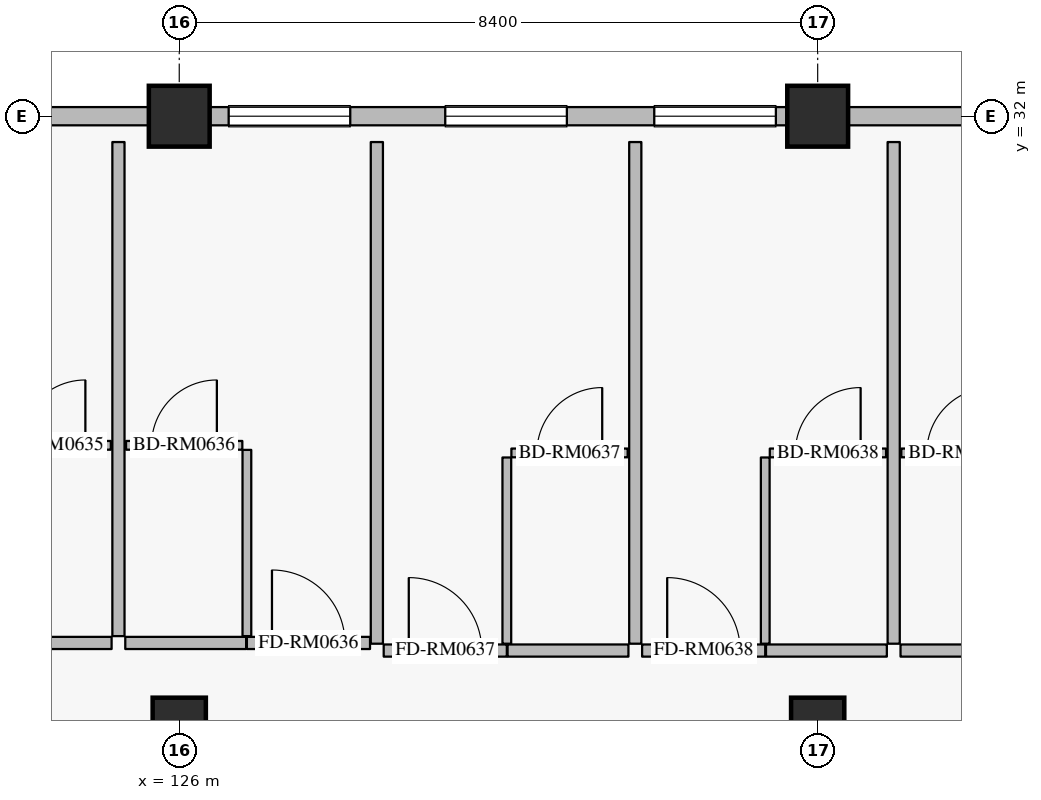
"""IFC4 building model, lengths in metres.
Left out: names, types, materials, properties, quantities, classifications, styles, units other than length and angle.
Written with IfcOpenShell. Run it as: python <this file> out.ifc"""

import sys

from ifc_helpers import new_model, si_unit, direction, frame, frame_2d, origin, origin_2d, place, context, subcontext, project, spatial, rectangle, extrude, element, fill, save


model = new_model("IFC4")
c1 = context("Model", 3, precision=1e-05, world=origin(), true_north=direction((0.0, 1.0)))
c2 = subcontext(c1, "Body", "Model", "MODEL_VIEW")
j1 = project(units=[si_unit("LENGTHUNIT", "METRE"), si_unit("PLANEANGLEUNIT", "RADIAN")], contexts=[c1])
p1 = place(None, origin())
s1 = spatial("IfcSite", under=j1, at=p1, CompositionType="ELEMENT")
p2 = place(p1, origin())
s2 = spatial("IfcBuilding", under=s1, at=p2, CompositionType="ELEMENT")
p3 = place(p2, frame((0.0, 0.0, 25.2)))
s3 = spatial("IfcBuildingStorey", under=s2, at=p3, CompositionType="ELEMENT", Elevation=25.2)
for number, where, z_axis, x_axis in (
    (1, (126.0, 32.0, 0.0), (0.0, 0.0, 1.0), (1.0, 0.0, 0.0)),
    (2, (134.4, 32.0, 0.0), (0.0, 0.0, 1.0), (1.0, 0.0, 0.0)),
):
    element("IfcColumn", number, at=place(p3, frame(where, z_axis=z_axis, x_axis=x_axis)), inside=s3, PredefinedType="COLUMN", context=c2, shape_type="SweptSolid", body=[
        extrude(rectangle(XDim=0.8, YDim=0.8, at=origin_2d()), origin(), (0.0, 0.0, 1.0), 3.6),
    ])
for number, where, z_axis, x_axis in (
    (3, (126.0, 24.0, 0.0), (0.0, 0.0, 1.0), (1.0, 0.0, 0.0)),
    (4, (134.4, 24.0, 0.0), (0.0, 0.0, 1.0), (1.0, 0.0, 0.0)),
):
    element("IfcColumn", number, at=place(p3, frame(where, z_axis=z_axis, x_axis=x_axis)), inside=s3, PredefinedType="COLUMN", context=c2, shape_type="SweptSolid", body=[
        extrude(rectangle(XDim=0.7, YDim=0.7, at=origin_2d()), origin(), (0.0, 0.0, 1.0), 3.6),
    ])
p4 = place(p3, frame((118.0, 32.0, 0.0), z_axis=(0.0, 0.0, 1.0), x_axis=(1.0, 0.0, 0.0)))
e5 = element("IfcWall", 5, at=p4, inside=s3, PredefinedType="SOLIDWALL", context=c2, shape_type="SweptSolid", body=[
    extrude(rectangle(XDim=7.6, YDim=0.24, at=frame_2d((3.8, 0.0))), origin(), (0.0, 0.0, 1.0), 2.93),
])
p5 = place(p4, frame((1.3, 0.0, 0.8)))
e6 = element("IfcOpeningElement", 6, at=p5, cuts=e5, PredefinedType="OPENING", context=c2, shape_type="SweptSolid", body=[
    extrude(rectangle(XDim=1.6, YDim=1.6, at=frame_2d((0.8, 0.8))), frame((0.0, 0.13, 0.0), z_axis=(0.0, -1.0, 0.0), x_axis=(1.0, 0.0, 0.0)), (0.0, 0.0, 1.0), 0.26),
])
p6 = place(p4, frame((4.7, 0.0, 0.8)))
e7 = element("IfcOpeningElement", 7, at=p6, cuts=e5, PredefinedType="OPENING", context=c2, shape_type="SweptSolid", body=[
    extrude(rectangle(XDim=1.6, YDim=1.6, at=frame_2d((0.8, 0.8))), frame((0.0, 0.13, 0.0), z_axis=(0.0, -1.0, 0.0), x_axis=(1.0, 0.0, 0.0)), (0.0, 0.0, 1.0), 0.26),
])
p7 = place(p3, frame((126.4, 32.0, 0.0), z_axis=(0.0, 0.0, 1.0), x_axis=(1.0, 0.0, 0.0)))
e8 = element("IfcWall", 8, at=p7, inside=s3, PredefinedType="SOLIDWALL", context=c2, shape_type="SweptSolid", body=[
    extrude(rectangle(XDim=7.6, YDim=0.24, at=frame_2d((3.8, 0.0))), origin(), (0.0, 0.0, 1.0), 2.93),
])
p8 = place(p7, frame((0.25, 0.0, 0.8)))
e9 = element("IfcOpeningElement", 9, at=p8, cuts=e8, PredefinedType="OPENING", context=c2, shape_type="SweptSolid", body=[
    extrude(rectangle(XDim=1.6, YDim=1.6, at=frame_2d((0.8, 0.8))), frame((0.0, 0.13, 0.0), z_axis=(0.0, -1.0, 0.0), x_axis=(1.0, 0.0, 0.0)), (0.0, 0.0, 1.0), 0.26),
])
p9 = place(p7, frame((3.1, 0.0, 0.8)))
e10 = element("IfcOpeningElement", 10, at=p9, cuts=e8, PredefinedType="OPENING", context=c2, shape_type="SweptSolid", body=[
    extrude(rectangle(XDim=1.6, YDim=1.6, at=frame_2d((0.8, 0.8))), frame((0.0, 0.13, 0.0), z_axis=(0.0, -1.0, 0.0), x_axis=(1.0, 0.0, 0.0)), (0.0, 0.0, 1.0), 0.26),
])
p10 = place(p7, frame((5.85, 0.0, 0.8)))
e11 = element("IfcOpeningElement", 11, at=p10, cuts=e8, PredefinedType="OPENING", context=c2, shape_type="SweptSolid", body=[
    extrude(rectangle(XDim=1.6, YDim=1.6, at=frame_2d((0.8, 0.8))), frame((0.0, 0.13, 0.0), z_axis=(0.0, -1.0, 0.0), x_axis=(1.0, 0.0, 0.0)), (0.0, 0.0, 1.0), 0.26),
])
p11 = place(p3, frame((134.8, 32.0, 0.0), z_axis=(0.0, 0.0, 1.0), x_axis=(1.0, 0.0, 0.0)))
e12 = element("IfcWall", 12, at=p11, inside=s3, PredefinedType="SOLIDWALL", context=c2, shape_type="SweptSolid", body=[
    extrude(rectangle(XDim=7.6, YDim=0.24, at=frame_2d((3.8, 0.0))), origin(), (0.0, 0.0, 1.0), 2.93),
])
p12 = place(p11, frame((1.5, 0.0, 0.8)))
e13 = element("IfcOpeningElement", 13, at=p12, cuts=e12, PredefinedType="OPENING", context=c2, shape_type="SweptSolid", body=[
    extrude(rectangle(XDim=1.6, YDim=1.6, at=frame_2d((0.8, 0.8))), frame((0.0, 0.13, 0.0), z_axis=(0.0, -1.0, 0.0), x_axis=(1.0, 0.0, 0.0)), (0.0, 0.0, 1.0), 0.26),
])
p13 = place(p11, frame((4.9, 0.0, 0.8)))
e14 = element("IfcOpeningElement", 14, at=p13, cuts=e12, PredefinedType="OPENING", context=c2, shape_type="SweptSolid", body=[
    extrude(rectangle(XDim=1.6, YDim=1.6, at=frame_2d((0.8, 0.8))), frame((0.0, 0.13, 0.0), z_axis=(0.0, -1.0, 0.0), x_axis=(1.0, 0.0, 0.0)), (0.0, 0.0, 1.0), 0.26),
])
p14 = place(p3, frame((123.52, 25.07, 0.0), z_axis=(0.0, 0.0, 1.0), x_axis=(1.0, 0.0, 0.0)))
e15 = element("IfcWall", 15, at=p14, inside=s3, PredefinedType="PARTITIONING", context=c2, shape_type="SweptSolid", body=[
    extrude(rectangle(XDim=1.59, YDim=0.16, at=frame_2d((0.795, 0.0))), origin(), (0.0, 0.0, 1.0), 3.335),
])
p15 = place(p3, frame((123.57, 27.67, 0.0), z_axis=(0.0, 0.0, 1.0), x_axis=(1.0, 0.0, 0.0)))
e16 = element("IfcWall", 16, at=p15, inside=s3, PredefinedType="PARTITIONING", context=c2, shape_type="SweptSolid", body=[
    extrude(rectangle(XDim=1.53, YDim=0.115, at=frame_2d((0.765, 0.0))), origin(), (0.0, 0.0, 1.0), 3.335),
])
p16 = place(p15, frame((0.335, 0.0, 0.0)))
e17 = element("IfcOpeningElement", 17, at=p16, cuts=e16, PredefinedType="OPENING", context=c2, shape_type="SweptSolid", body=[
    extrude(rectangle(XDim=0.86, YDim=2.12, at=frame_2d((0.43, 1.06))), frame((0.0, 0.067, 0.0), z_axis=(0.0, -1.0, 0.0), x_axis=(1.0, 0.0, 0.0)), (0.0, 0.0, 1.0), 0.135),
])
p17 = place(p3, frame((125.29, 25.07, 0.0), z_axis=(0.0, 0.0, 1.0), x_axis=(1.0, 0.0, 0.0)))
e18 = element("IfcWall", 18, at=p17, inside=s3, PredefinedType="PARTITIONING", context=c2, shape_type="SweptSolid", body=[
    extrude(rectangle(XDim=1.59, YDim=0.16, at=frame_2d((0.795, 0.0))), origin(), (0.0, 0.0, 1.0), 3.335),
])
p18 = place(p3, frame((126.89, 25.07, 0.0), z_axis=(0.0, 0.0, 1.0), x_axis=(1.0, 0.0, 0.0)))
e19 = element("IfcWall", 19, at=p18, inside=s3, PredefinedType="PARTITIONING", context=c2, shape_type="SweptSolid", body=[
    extrude(rectangle(XDim=1.62, YDim=0.16, at=frame_2d((0.81, 0.0))), origin(), (0.0, 0.0, 1.0), 3.335),
])
p19 = place(p18, frame((0.33, 0.0, 0.0)))
e20 = element("IfcOpeningElement", 20, at=p19, cuts=e19, PredefinedType="OPENING", context=c2, shape_type="SweptSolid", body=[
    extrude(rectangle(XDim=0.96, YDim=2.2, at=frame_2d((0.48, 1.1))), frame((0.0, 0.09, 0.0), z_axis=(0.0, -1.0, 0.0), x_axis=(1.0, 0.0, 0.0)), (0.0, 0.0, 1.0), 0.18),
])
p20 = place(p3, frame((126.89, 25.16, 0.0), z_axis=(0.0, 0.0, 1.0), x_axis=(0.0, 1.0, 0.0)))
e21 = element("IfcWall", 21, at=p20, inside=s3, PredefinedType="PARTITIONING", context=c2, shape_type="SweptSolid", body=[
    extrude(rectangle(XDim=2.45, YDim=0.115, at=frame_2d((1.225, 0.0))), origin(), (0.0, 0.0, 1.0), 3.335),
])
p21 = place(p3, frame((125.3, 27.67, 0.0), z_axis=(0.0, 0.0, 1.0), x_axis=(1.0, 0.0, 0.0)))
e22 = element("IfcWall", 22, at=p21, inside=s3, PredefinedType="PARTITIONING", context=c2, shape_type="SweptSolid", body=[
    extrude(rectangle(XDim=1.53, YDim=0.115, at=frame_2d((0.765, 0.0))), origin(), (0.0, 0.0, 1.0), 3.335),
])
p22 = place(p21, frame((0.335, 0.0, 0.0)))
e23 = element("IfcOpeningElement", 23, at=p22, cuts=e22, PredefinedType="OPENING", context=c2, shape_type="SweptSolid", body=[
    extrude(rectangle(XDim=0.86, YDim=2.12, at=frame_2d((0.43, 1.06))), frame((0.0, 0.067, 0.0), z_axis=(0.0, -1.0, 0.0), x_axis=(1.0, 0.0, 0.0)), (0.0, 0.0, 1.0), 0.135),
])
p23 = place(p3, frame((125.2, 25.16, 0.0), z_axis=(0.0, 0.0, 1.0), x_axis=(0.0, 1.0, 0.0)))
e24 = element("IfcWall", 24, at=p23, inside=s3, PredefinedType="PARTITIONING", context=c2, shape_type="SweptSolid", body=[
    extrude(rectangle(XDim=6.5, YDim=0.16, at=frame_2d((3.25, 0.0))), origin(), (0.0, 0.0, 1.0), 3.335),
])
p24 = place(p3, frame((128.69, 24.97, 0.0), z_axis=(0.0, 0.0, 1.0), x_axis=(1.0, 0.0, 0.0)))
e25 = element("IfcWall", 25, at=p24, inside=s3, PredefinedType="PARTITIONING", context=c2, shape_type="SweptSolid", body=[
    extrude(rectangle(XDim=1.62, YDim=0.16, at=frame_2d((0.81, 0.0))), origin(), (0.0, 0.0, 1.0), 3.335),
])
p25 = place(p24, frame((0.33, 0.0, 0.0)))
e26 = element("IfcOpeningElement", 26, at=p25, cuts=e25, PredefinedType="OPENING", context=c2, shape_type="SweptSolid", body=[
    extrude(rectangle(XDim=0.96, YDim=2.2, at=frame_2d((0.48, 1.1))), frame((0.0, 0.09, 0.0), z_axis=(0.0, -1.0, 0.0), x_axis=(1.0, 0.0, 0.0)), (0.0, 0.0, 1.0), 0.18),
])
p26 = place(p3, frame((130.32, 24.97, 0.0), z_axis=(0.0, 0.0, 1.0), x_axis=(1.0, 0.0, 0.0)))
e27 = element("IfcWall", 27, at=p26, inside=s3, PredefinedType="PARTITIONING", context=c2, shape_type="SweptSolid", body=[
    extrude(rectangle(XDim=1.59, YDim=0.16, at=frame_2d((0.795, 0.0))), origin(), (0.0, 0.0, 1.0), 3.335),
])
p27 = place(p3, frame((130.31, 25.06, 0.0), z_axis=(0.0, 0.0, 1.0), x_axis=(0.0, 1.0, 0.0)))
e28 = element("IfcWall", 28, at=p27, inside=s3, PredefinedType="PARTITIONING", context=c2, shape_type="SweptSolid", body=[
    extrude(rectangle(XDim=2.45, YDim=0.115, at=frame_2d((1.225, 0.0))), origin(), (0.0, 0.0, 1.0), 3.335),
])
p28 = place(p3, frame((130.37, 27.57, 0.0), z_axis=(0.0, 0.0, 1.0), x_axis=(1.0, 0.0, 0.0)))
e29 = element("IfcWall", 29, at=p28, inside=s3, PredefinedType="PARTITIONING", context=c2, shape_type="SweptSolid", body=[
    extrude(rectangle(XDim=1.53, YDim=0.115, at=frame_2d((0.765, 0.0))), origin(), (0.0, 0.0, 1.0), 3.335),
])
p29 = place(p28, frame((0.335, 0.0, 0.0)))
e30 = element("IfcOpeningElement", 30, at=p29, cuts=e29, PredefinedType="OPENING", context=c2, shape_type="SweptSolid", body=[
    extrude(rectangle(XDim=0.86, YDim=2.12, at=frame_2d((0.43, 1.06))), frame((0.0, 0.067, 0.0), z_axis=(0.0, -1.0, 0.0), x_axis=(1.0, 0.0, 0.0)), (0.0, 0.0, 1.0), 0.135),
])
p30 = place(p3, frame((128.6, 25.06, 0.0), z_axis=(0.0, 0.0, 1.0), x_axis=(0.0, 1.0, 0.0)))
e31 = element("IfcWall", 31, at=p30, inside=s3, PredefinedType="PARTITIONING", context=c2, shape_type="SweptSolid", body=[
    extrude(rectangle(XDim=6.6, YDim=0.16, at=frame_2d((3.3, 0.0))), origin(), (0.0, 0.0, 1.0), 3.335),
])
p31 = place(p3, frame((132.09, 24.97, 0.0), z_axis=(0.0, 0.0, 1.0), x_axis=(1.0, 0.0, 0.0)))
e32 = element("IfcWall", 32, at=p31, inside=s3, PredefinedType="PARTITIONING", context=c2, shape_type="SweptSolid", body=[
    extrude(rectangle(XDim=1.62, YDim=0.16, at=frame_2d((0.81, 0.0))), origin(), (0.0, 0.0, 1.0), 3.335),
])
p32 = place(p31, frame((0.33, 0.0, 0.0)))
e33 = element("IfcOpeningElement", 33, at=p32, cuts=e32, PredefinedType="OPENING", context=c2, shape_type="SweptSolid", body=[
    extrude(rectangle(XDim=0.96, YDim=2.2, at=frame_2d((0.48, 1.1))), frame((0.0, 0.09, 0.0), z_axis=(0.0, -1.0, 0.0), x_axis=(1.0, 0.0, 0.0)), (0.0, 0.0, 1.0), 0.18),
])
p33 = place(p3, frame((133.72, 24.97, 0.0), z_axis=(0.0, 0.0, 1.0), x_axis=(1.0, 0.0, 0.0)))
e34 = element("IfcWall", 34, at=p33, inside=s3, PredefinedType="PARTITIONING", context=c2, shape_type="SweptSolid", body=[
    extrude(rectangle(XDim=1.59, YDim=0.16, at=frame_2d((0.795, 0.0))), origin(), (0.0, 0.0, 1.0), 3.335),
])
p34 = place(p3, frame((133.71, 25.06, 0.0), z_axis=(0.0, 0.0, 1.0), x_axis=(0.0, 1.0, 0.0)))
e35 = element("IfcWall", 35, at=p34, inside=s3, PredefinedType="PARTITIONING", context=c2, shape_type="SweptSolid", body=[
    extrude(rectangle(XDim=2.45, YDim=0.115, at=frame_2d((1.225, 0.0))), origin(), (0.0, 0.0, 1.0), 3.335),
])
p35 = place(p3, frame((133.77, 27.57, 0.0), z_axis=(0.0, 0.0, 1.0), x_axis=(1.0, 0.0, 0.0)))
e36 = element("IfcWall", 36, at=p35, inside=s3, PredefinedType="PARTITIONING", context=c2, shape_type="SweptSolid", body=[
    extrude(rectangle(XDim=1.53, YDim=0.115, at=frame_2d((0.765, 0.0))), origin(), (0.0, 0.0, 1.0), 3.335),
])
p36 = place(p35, frame((0.335, 0.0, 0.0)))
e37 = element("IfcOpeningElement", 37, at=p36, cuts=e36, PredefinedType="OPENING", context=c2, shape_type="SweptSolid", body=[
    extrude(rectangle(XDim=0.86, YDim=2.12, at=frame_2d((0.43, 1.06))), frame((0.0, 0.067, 0.0), z_axis=(0.0, -1.0, 0.0), x_axis=(1.0, 0.0, 0.0)), (0.0, 0.0, 1.0), 0.135),
])
p37 = place(p3, frame((132.0, 25.06, 0.0), z_axis=(0.0, 0.0, 1.0), x_axis=(0.0, 1.0, 0.0)))
e38 = element("IfcWall", 38, at=p37, inside=s3, PredefinedType="PARTITIONING", context=c2, shape_type="SweptSolid", body=[
    extrude(rectangle(XDim=6.6, YDim=0.16, at=frame_2d((3.3, 0.0))), origin(), (0.0, 0.0, 1.0), 3.335),
])
p38 = place(p3, frame((135.49, 24.97, 0.0), z_axis=(0.0, 0.0, 1.0), x_axis=(1.0, 0.0, 0.0)))
e39 = element("IfcWall", 39, at=p38, inside=s3, PredefinedType="PARTITIONING", context=c2, shape_type="SweptSolid", body=[
    extrude(rectangle(XDim=1.59, YDim=0.16, at=frame_2d((0.795, 0.0))), origin(), (0.0, 0.0, 1.0), 3.335),
])
p39 = place(p3, frame((135.5, 27.57, 0.0), z_axis=(0.0, 0.0, 1.0), x_axis=(1.0, 0.0, 0.0)))
e40 = element("IfcWall", 40, at=p39, inside=s3, PredefinedType="PARTITIONING", context=c2, shape_type="SweptSolid", body=[
    extrude(rectangle(XDim=1.53, YDim=0.115, at=frame_2d((0.765, 0.0))), origin(), (0.0, 0.0, 1.0), 3.335),
])
p40 = place(p39, frame((0.335, 0.0, 0.0)))
e41 = element("IfcOpeningElement", 41, at=p40, cuts=e40, PredefinedType="OPENING", context=c2, shape_type="SweptSolid", body=[
    extrude(rectangle(XDim=0.86, YDim=2.12, at=frame_2d((0.43, 1.06))), frame((0.0, 0.067, 0.0), z_axis=(0.0, -1.0, 0.0), x_axis=(1.0, 0.0, 0.0)), (0.0, 0.0, 1.0), 0.135),
])
p41 = place(p3, frame((135.4, 25.06, 0.0), z_axis=(0.0, 0.0, 1.0), x_axis=(0.0, 1.0, 0.0)))
e42 = element("IfcWall", 42, at=p41, inside=s3, PredefinedType="PARTITIONING", context=c2, shape_type="SweptSolid", body=[
    extrude(rectangle(XDim=6.6, YDim=0.16, at=frame_2d((3.3, 0.0))), origin(), (0.0, 0.0, 1.0), 3.335),
])
p42 = place(p8, origin())
e43 = element("IfcWindow", 43, at=p42, inside=s3, PartitioningType="SINGLE_PANEL", PredefinedType="WINDOW", context=c2, shape_type="SweptSolid", body=[
    extrude(rectangle(XDim=1.6, YDim=1.6, at=frame_2d((0.8, 0.8))), frame((0.0, 0.03, 0.0), z_axis=(0.0, -1.0, 0.0), x_axis=(1.0, 0.0, 0.0)), (0.0, 0.0, 1.0), 0.06),
])
fill(e9, e43)
p43 = place(p9, origin())
e44 = element("IfcWindow", 44, at=p43, inside=s3, PartitioningType="SINGLE_PANEL", PredefinedType="WINDOW", context=c2, shape_type="SweptSolid", body=[
    extrude(rectangle(XDim=1.6, YDim=1.6, at=frame_2d((0.8, 0.8))), frame((0.0, 0.03, 0.0), z_axis=(0.0, -1.0, 0.0), x_axis=(1.0, 0.0, 0.0)), (0.0, 0.0, 1.0), 0.06),
])
fill(e10, e44)
p44 = place(p10, origin())
e45 = element("IfcWindow", 45, at=p44, inside=s3, PartitioningType="SINGLE_PANEL", PredefinedType="WINDOW", context=c2, shape_type="SweptSolid", body=[
    extrude(rectangle(XDim=1.6, YDim=1.6, at=frame_2d((0.8, 0.8))), frame((0.0, 0.03, 0.0), z_axis=(0.0, -1.0, 0.0), x_axis=(1.0, 0.0, 0.0)), (0.0, 0.0, 1.0), 0.06),
])
fill(e11, e45)
p45 = place(p16, origin())
e46 = element("IfcDoor", 46, at=p45, inside=s3, OperationType="SINGLE_SWING_RIGHT", PredefinedType="DOOR", context=c2, shape_type="SweptSolid", body=[
    extrude(rectangle(XDim=0.86, YDim=2.12, at=frame_2d((0.43, 1.06))), frame((0.0, 0.025, 0.0), z_axis=(0.0, -1.0, 0.0), x_axis=(1.0, 0.0, 0.0)), (0.0, 0.0, 1.0), 0.05),
])
fill(e17, e46)
p46 = place(p19, origin())
e47 = element("IfcDoor", 47, at=p46, inside=s3, OperationType="SINGLE_SWING_LEFT", PredefinedType="DOOR", context=c2, shape_type="SweptSolid", body=[
    extrude(rectangle(XDim=0.96, YDim=2.2, at=frame_2d((0.48, 1.1))), frame((0.0, 0.025, 0.0), z_axis=(0.0, -1.0, 0.0), x_axis=(1.0, 0.0, 0.0)), (0.0, 0.0, 1.0), 0.05),
])
fill(e20, e47)
p47 = place(p22, origin())
e48 = element("IfcDoor", 48, at=p47, inside=s3, OperationType="SINGLE_SWING_RIGHT", PredefinedType="DOOR", context=c2, shape_type="SweptSolid", body=[
    extrude(rectangle(XDim=0.86, YDim=2.12, at=frame_2d((0.43, 1.06))), frame((0.0, 0.025, 0.0), z_axis=(0.0, -1.0, 0.0), x_axis=(1.0, 0.0, 0.0)), (0.0, 0.0, 1.0), 0.05),
])
fill(e23, e48)
p48 = place(p25, origin())
e49 = element("IfcDoor", 49, at=p48, inside=s3, OperationType="SINGLE_SWING_LEFT", PredefinedType="DOOR", context=c2, shape_type="SweptSolid", body=[
    extrude(rectangle(XDim=0.96, YDim=2.2, at=frame_2d((0.48, 1.1))), frame((0.0, 0.025, 0.0), z_axis=(0.0, -1.0, 0.0), x_axis=(1.0, 0.0, 0.0)), (0.0, 0.0, 1.0), 0.05),
])
fill(e26, e49)
p49 = place(p29, origin())
e50 = element("IfcDoor", 50, at=p49, inside=s3, OperationType="SINGLE_SWING_RIGHT", PredefinedType="DOOR", context=c2, shape_type="SweptSolid", body=[
    extrude(rectangle(XDim=0.86, YDim=2.12, at=frame_2d((0.43, 1.06))), frame((0.0, 0.025, 0.0), z_axis=(0.0, -1.0, 0.0), x_axis=(1.0, 0.0, 0.0)), (0.0, 0.0, 1.0), 0.05),
])
fill(e30, e50)
p50 = place(p32, origin())
e51 = element("IfcDoor", 51, at=p50, inside=s3, OperationType="SINGLE_SWING_LEFT", PredefinedType="DOOR", context=c2, shape_type="SweptSolid", body=[
    extrude(rectangle(XDim=0.96, YDim=2.2, at=frame_2d((0.48, 1.1))), frame((0.0, 0.025, 0.0), z_axis=(0.0, -1.0, 0.0), x_axis=(1.0, 0.0, 0.0)), (0.0, 0.0, 1.0), 0.05),
])
fill(e33, e51)
p51 = place(p36, origin())
e52 = element("IfcDoor", 52, at=p51, inside=s3, OperationType="SINGLE_SWING_RIGHT", PredefinedType="DOOR", context=c2, shape_type="SweptSolid", body=[
    extrude(rectangle(XDim=0.86, YDim=2.12, at=frame_2d((0.43, 1.06))), frame((0.0, 0.025, 0.0), z_axis=(0.0, -1.0, 0.0), x_axis=(1.0, 0.0, 0.0)), (0.0, 0.0, 1.0), 0.05),
])
fill(e37, e52)
p52 = place(p40, origin())
e53 = element("IfcDoor", 53, at=p52, inside=s3, OperationType="SINGLE_SWING_RIGHT", PredefinedType="DOOR", context=c2, shape_type="SweptSolid", body=[
    extrude(rectangle(XDim=0.86, YDim=2.12, at=frame_2d((0.43, 1.06))), frame((0.0, 0.025, 0.0), z_axis=(0.0, -1.0, 0.0), x_axis=(1.0, 0.0, 0.0)), (0.0, 0.0, 1.0), 0.05),
])
fill(e41, e53)
save(model, sys.argv[1])
